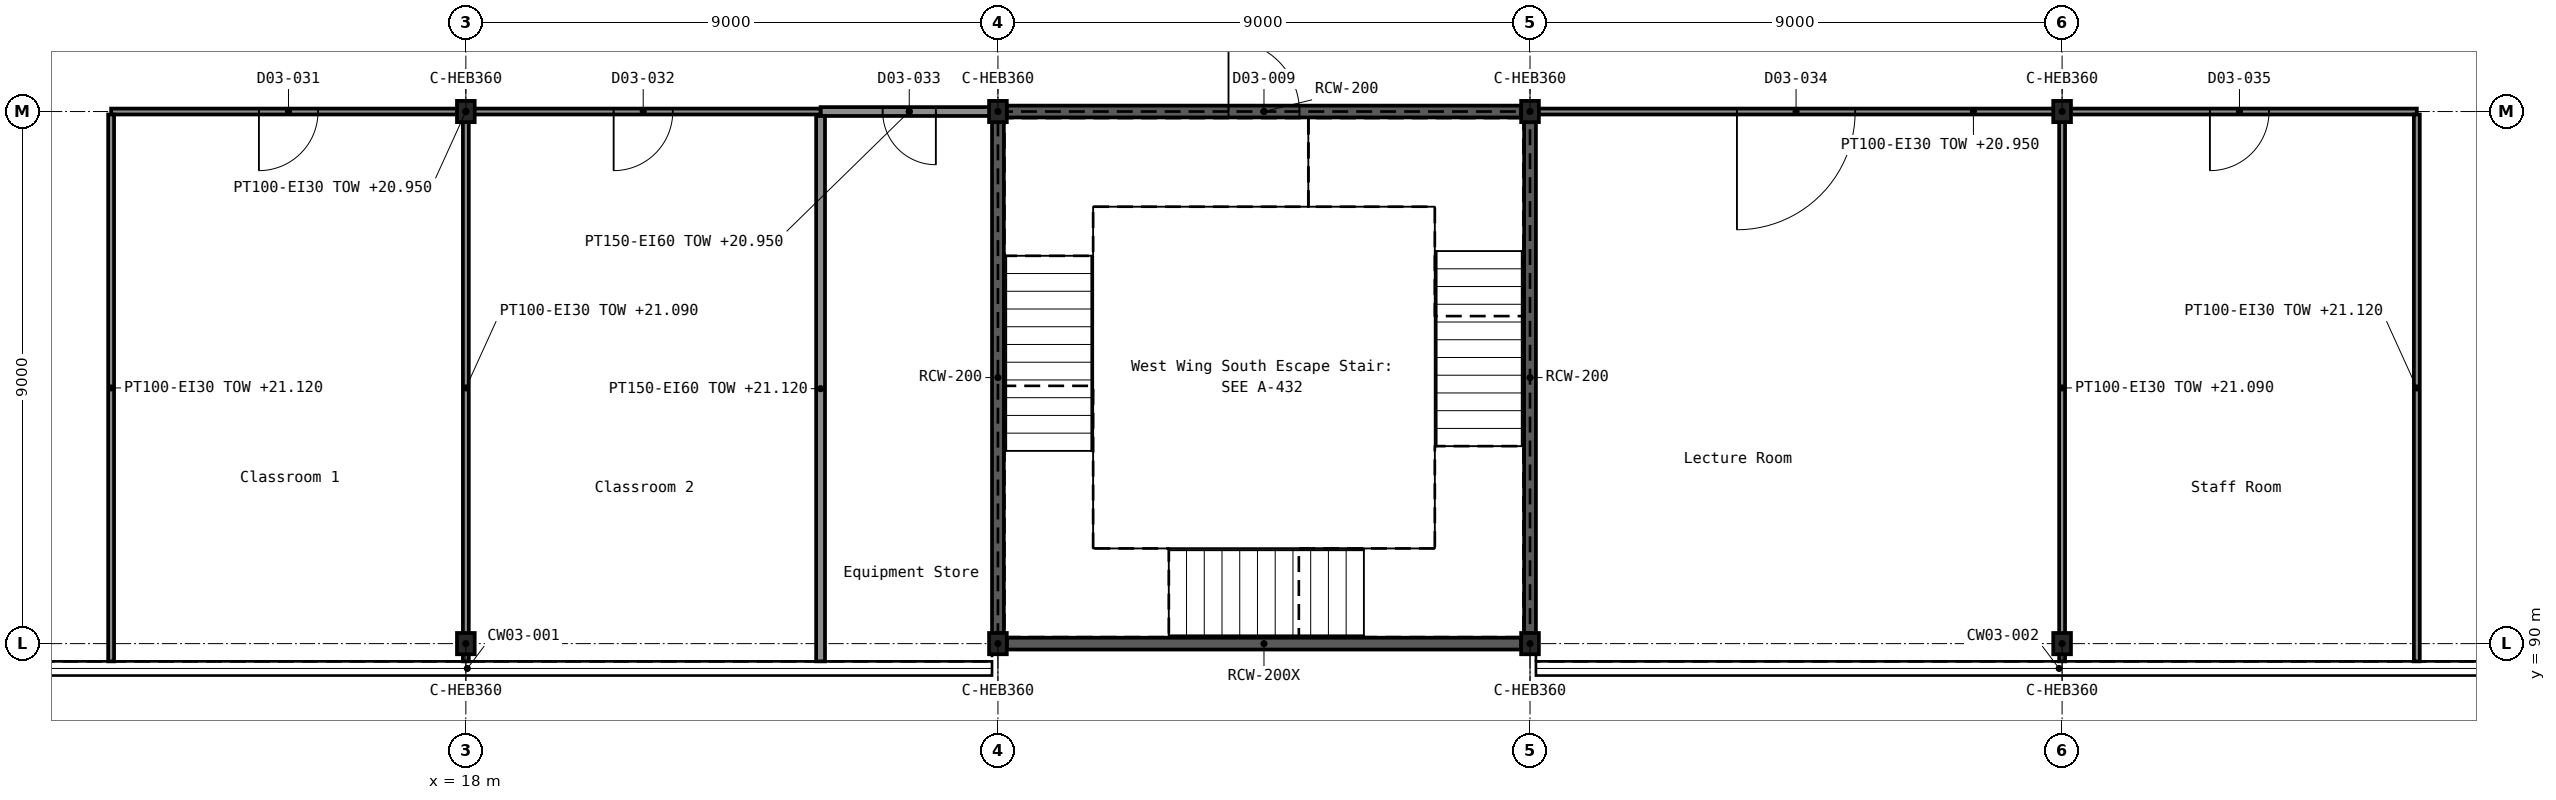
"""IFC4 building model, lengths in metres.
Left out: names, types, materials, properties, quantities, classifications, styles, units other than length and angle.
Written with IfcOpenShell. Run it as: python <this file> out.ifc"""

import sys

from ifc_helpers import new_model, si_unit, direction, frame, frame_2d, origin, origin_2d, place, context, subcontext, project, spatial, rectangle, i_section, extrude, element, fill, save


model = new_model("IFC4")
c1 = context("Model", 3, precision=1e-05, world=origin(), true_north=direction((0.0, 1.0)))
c2 = subcontext(c1, "Body", "Model", "MODEL_VIEW")
j1 = project(units=[si_unit("LENGTHUNIT", "METRE"), si_unit("PLANEANGLEUNIT", "RADIAN")], contexts=[c1])
p1 = place(None, origin())
s1 = spatial("IfcSite", under=j1, at=p1, CompositionType="ELEMENT")
p2 = place(p1, origin())
s2 = spatial("IfcBuilding", under=s1, at=p2, CompositionType="ELEMENT")
p3 = place(p2, frame((0.0, 0.0, 16.2)))
s3 = spatial("IfcBuildingStorey", under=s2, at=p3, CompositionType="ELEMENT", Elevation=16.2)
for number, where, z_axis, x_axis in (
    (1, (18.0, 90.0, 0.0), (0.0, 0.0, 1.0), (1.0, 0.0, 0.0)),
    (2, (27.0, 90.0, 0.0), (0.0, 0.0, 1.0), (1.0, 0.0, 0.0)),
    (3, (36.0, 90.0, 0.0), (0.0, 0.0, 1.0), (1.0, 0.0, 0.0)),
    (4, (45.0, 90.0, 0.0), (0.0, 0.0, 1.0), (1.0, 0.0, 0.0)),
    (5, (18.0, 99.0, 0.0), (0.0, 0.0, 1.0), (1.0, 0.0, 0.0)),
    (6, (27.0, 99.0, 0.0), (0.0, 0.0, 1.0), (1.0, 0.0, 0.0)),
    (7, (36.0, 99.0, 0.0), (0.0, 0.0, 1.0), (1.0, 0.0, 0.0)),
    (8, (45.0, 99.0, 0.0), (0.0, 0.0, 1.0), (1.0, 0.0, 0.0)),
):
    element("IfcColumn", number, at=place(p3, frame(where, z_axis=z_axis, x_axis=x_axis)), inside=s3, PredefinedType="COLUMN", context=c2, shape_type="SweptSolid", body=[
        extrude(i_section(OverallWidth=0.3, OverallDepth=0.36, WebThickness=0.012, FlangeThickness=0.022, FilletRadius=0.027, at=origin_2d()), origin(), (0.0, 0.0, 1.0), 5.4),
    ])
p4 = place(p3, frame((27.15, 90.0, 0.0), z_axis=(0.0, 0.0, 1.0), x_axis=(1.0, 0.0, 0.0)))
e9 = element("IfcWall", 9, at=p4, inside=s3, PredefinedType="SHEAR", context=c2, shape_type="SweptSolid", body=[
    extrude(rectangle(XDim=8.7, YDim=0.2, at=frame_2d((4.35, 0.0))), origin(), (0.0, 0.0, 1.0), 5.4),
])
p5 = place(p3, frame((27.15, 99.0, 0.0), z_axis=(0.0, 0.0, 1.0), x_axis=(1.0, 0.0, 0.0)))
e10 = element("IfcWall", 10, at=p5, inside=s3, PredefinedType="SHEAR", context=c2, shape_type="SweptSolid", body=[
    extrude(rectangle(XDim=8.7, YDim=0.2, at=frame_2d((4.35, 0.0))), origin(), (0.0, 0.0, 1.0), 5.4),
])
p6 = place(p5, frame((3.75, 0.0, 0.0)))
e11 = element("IfcOpeningElement", 11, at=p6, cuts=e10, PredefinedType="OPENING", context=c2, shape_type="SweptSolid", body=[
    extrude(rectangle(XDim=1.2, YDim=2.1, at=frame_2d((0.6, 1.05))), frame((0.0, 0.111, 0.0), z_axis=(0.0, -1.0, 0.0), x_axis=(1.0, 0.0, 0.0)), (0.0, 0.0, 1.0), 0.222),
])
for number, where, z_axis, x_axis in (
    (12, (27.0, 90.18, 0.0), (0.0, 0.0, 1.0), (0.0, 1.0, 0.0)),
    (13, (36.0, 90.18, 0.0), (0.0, 0.0, 1.0), (0.0, 1.0, 0.0)),
):
    element("IfcWall", number, at=place(p3, frame(where, z_axis=z_axis, x_axis=x_axis)), inside=s3, PredefinedType="SHEAR", context=c2, shape_type="SweptSolid", body=[
        extrude(rectangle(XDim=8.64, YDim=0.2, at=frame_2d((4.32, 0.0))), origin(), (0.0, 0.0, 1.0), 5.4),
    ])
p7 = place(p3, frame((24.0, 99.0, 0.0), z_axis=(0.0, 0.0, 1.0), x_axis=(1.0, 0.0, 0.0)))
e14 = element("IfcWall", 14, at=p7, inside=s3, PredefinedType="PARTITIONING", context=c2, shape_type="SweptSolid", body=[
    extrude(rectangle(XDim=3.0, YDim=0.15, at=frame_2d((1.5, 0.0))), origin(), (0.0, 0.0, 1.0), 4.75),
])
p8 = place(p7, frame((1.05, 0.0, 0.0)))
e15 = element("IfcOpeningElement", 15, at=p8, cuts=e14, PredefinedType="OPENING", context=c2, shape_type="SweptSolid", body=[
    extrude(rectangle(XDim=0.9, YDim=2.4, at=frame_2d((0.45, 1.2))), frame((0.0, 0.086, 0.0), z_axis=(0.0, -1.0, 0.0), x_axis=(1.0, 0.0, 0.0)), (0.0, 0.0, 1.0), 0.172),
])
p9 = place(p3, frame((24.0, 89.7, 0.0), z_axis=(0.0, 0.0, 1.0), x_axis=(0.0, 1.0, 0.0)))
e16 = element("IfcWall", 16, at=p9, inside=s3, PredefinedType="PARTITIONING", context=c2, shape_type="SweptSolid", body=[
    extrude(rectangle(XDim=9.225, YDim=0.15, at=frame_2d((4.613, 0.0))), origin(), (0.0, 0.0, 1.0), 4.92),
])
p10 = place(p3, frame((12.0, 99.0, 0.0), z_axis=(0.0, 0.0, 1.0), x_axis=(1.0, 0.0, 0.0)))
e17 = element("IfcWall", 17, at=p10, inside=s3, PredefinedType="PARTITIONING", context=c2, shape_type="SweptSolid", body=[
    extrude(rectangle(XDim=12.0, YDim=0.1, at=frame_2d((6.0, 0.0))), origin(), (0.0, 0.0, 1.0), 4.75),
])
p11 = place(p10, frame((2.5, 0.0, 0.0)))
e18 = element("IfcOpeningElement", 18, at=p11, cuts=e17, PredefinedType="OPENING", context=c2, shape_type="SweptSolid", body=[
    extrude(rectangle(XDim=1.0, YDim=2.1, at=frame_2d((0.5, 1.05))), frame((0.0, 0.061, 0.0), z_axis=(0.0, -1.0, 0.0), x_axis=(1.0, 0.0, 0.0)), (0.0, 0.0, 1.0), 0.122),
])
p12 = place(p10, frame((8.5, 0.0, 0.0)))
e19 = element("IfcOpeningElement", 19, at=p12, cuts=e17, PredefinedType="OPENING", context=c2, shape_type="SweptSolid", body=[
    extrude(rectangle(XDim=1.0, YDim=2.1, at=frame_2d((0.5, 1.05))), frame((0.0, 0.061, 0.0), z_axis=(0.0, -1.0, 0.0), x_axis=(1.0, 0.0, 0.0)), (0.0, 0.0, 1.0), 0.122),
])
p13 = place(p3, frame((36.0, 99.0, 0.0), z_axis=(0.0, 0.0, 1.0), x_axis=(1.0, 0.0, 0.0)))
e20 = element("IfcWall", 20, at=p13, inside=s3, PredefinedType="PARTITIONING", context=c2, shape_type="SweptSolid", body=[
    extrude(rectangle(XDim=15.0, YDim=0.1, at=frame_2d((7.5, 0.0))), origin(), (0.0, 0.0, 1.0), 4.75),
])
p14 = place(p13, frame((3.5, 0.0, 0.0)))
e21 = element("IfcOpeningElement", 21, at=p14, cuts=e20, PredefinedType="OPENING", context=c2, shape_type="SweptSolid", body=[
    extrude(rectangle(XDim=2.0, YDim=2.1, at=frame_2d((1.0, 1.05))), frame((0.0, 0.061, 0.0), z_axis=(0.0, -1.0, 0.0), x_axis=(1.0, 0.0, 0.0)), (0.0, 0.0, 1.0), 0.122),
])
p15 = place(p13, frame((11.5, 0.0, 0.0)))
e22 = element("IfcOpeningElement", 22, at=p15, cuts=e20, PredefinedType="OPENING", context=c2, shape_type="SweptSolid", body=[
    extrude(rectangle(XDim=1.0, YDim=2.1, at=frame_2d((0.5, 1.05))), frame((0.0, 0.061, 0.0), z_axis=(0.0, -1.0, 0.0), x_axis=(1.0, 0.0, 0.0)), (0.0, 0.0, 1.0), 0.122),
])
p16 = place(p3, frame((12.0, 89.7, 0.0), z_axis=(0.0, 0.0, 1.0), x_axis=(0.0, 1.0, 0.0)))
e23 = element("IfcWall", 23, at=p16, inside=s3, PredefinedType="PARTITIONING", context=c2, shape_type="SweptSolid", body=[
    extrude(rectangle(XDim=9.25, YDim=0.1, at=frame_2d((4.625, 0.0))), origin(), (0.0, 0.0, 1.0), 4.92),
])
for number, where, z_axis, x_axis in (
    (24, (18.0, 89.7, 0.0), (0.0, 0.0, 1.0), (0.0, 1.0, 0.0)),
    (25, (45.0, 89.7, 0.0), (0.0, 0.0, 1.0), (0.0, 1.0, 0.0)),
):
    element("IfcWall", number, at=place(p3, frame(where, z_axis=z_axis, x_axis=x_axis)), inside=s3, PredefinedType="PARTITIONING", context=c2, shape_type="SweptSolid", body=[
        extrude(rectangle(XDim=9.25, YDim=0.1, at=frame_2d((4.625, 0.0))), origin(), (0.0, 0.0, 1.0), 4.89),
    ])
p17 = place(p3, frame((51.0, 89.7, 0.0), z_axis=(0.0, 0.0, 1.0), x_axis=(0.0, 1.0, 0.0)))
e26 = element("IfcWall", 26, at=p17, inside=s3, PredefinedType="PARTITIONING", context=c2, shape_type="SweptSolid", body=[
    extrude(rectangle(XDim=9.25, YDim=0.1, at=frame_2d((4.625, 0.0))), origin(), (0.0, 0.0, 1.0), 4.92),
])
p18 = place(p6, origin())
e27 = element("IfcDoor", 27, at=p18, inside=s3, OperationType="SINGLE_SWING_LEFT", PredefinedType="DOOR", context=c2, shape_type="SweptSolid", body=[
    extrude(rectangle(XDim=1.2, YDim=2.1, at=frame_2d((0.6, 1.05))), frame((0.0, 0.025, 0.0), z_axis=(0.0, -1.0, 0.0), x_axis=(1.0, 0.0, 0.0)), (0.0, 0.0, 1.0), 0.05),
])
fill(e11, e27)
p19 = place(p11, frame((1.0, 0.0, 0.0), z_axis=(0.0, 0.0, 1.0), x_axis=(-1.0, 0.0, 0.0)))
e28 = element("IfcDoor", 28, at=p19, inside=s3, OperationType="SINGLE_SWING_RIGHT", PredefinedType="DOOR", context=c2, shape_type="SweptSolid", body=[
    extrude(rectangle(XDim=1.0, YDim=2.1, at=frame_2d((0.5, 1.05))), frame((0.0, 0.025, 0.0), z_axis=(0.0, -1.0, 0.0), x_axis=(1.0, 0.0, 0.0)), (0.0, 0.0, 1.0), 0.05),
])
fill(e18, e28)
p20 = place(p12, frame((1.0, 0.0, 0.0), z_axis=(0.0, 0.0, 1.0), x_axis=(-1.0, 0.0, 0.0)))
e29 = element("IfcDoor", 29, at=p20, inside=s3, OperationType="SINGLE_SWING_RIGHT", PredefinedType="DOOR", context=c2, shape_type="SweptSolid", body=[
    extrude(rectangle(XDim=1.0, YDim=2.1, at=frame_2d((0.5, 1.05))), frame((0.0, 0.025, 0.0), z_axis=(0.0, -1.0, 0.0), x_axis=(1.0, 0.0, 0.0)), (0.0, 0.0, 1.0), 0.05),
])
fill(e19, e29)
p21 = place(p8, frame((0.9, 0.0, 0.0), z_axis=(0.0, 0.0, 1.0), x_axis=(-1.0, 0.0, 0.0)))
e30 = element("IfcDoor", 30, at=p21, inside=s3, OperationType="SINGLE_SWING_LEFT", PredefinedType="DOOR", context=c2, shape_type="SweptSolid", body=[
    extrude(rectangle(XDim=0.9, YDim=2.4, at=frame_2d((0.45, 1.2))), frame((0.0, 0.025, 0.0), z_axis=(0.0, -1.0, 0.0), x_axis=(1.0, 0.0, 0.0)), (0.0, 0.0, 1.0), 0.05),
])
fill(e15, e30)
p22 = place(p14, frame((2.0, 0.0, 0.0), z_axis=(0.0, 0.0, 1.0), x_axis=(-1.0, 0.0, 0.0)))
e31 = element("IfcDoor", 31, at=p22, inside=s3, OperationType="DOUBLE_DOOR_SINGLE_SWING", PredefinedType="DOOR", context=c2, shape_type="SweptSolid", body=[
    extrude(rectangle(XDim=2.0, YDim=2.1, at=frame_2d((1.0, 1.05))), frame((0.0, 0.025, 0.0), z_axis=(0.0, -1.0, 0.0), x_axis=(1.0, 0.0, 0.0)), (0.0, 0.0, 1.0), 0.05),
])
fill(e21, e31)
p23 = place(p15, frame((1.0, 0.0, 0.0), z_axis=(0.0, 0.0, 1.0), x_axis=(-1.0, 0.0, 0.0)))
e32 = element("IfcDoor", 32, at=p23, inside=s3, OperationType="SINGLE_SWING_RIGHT", PredefinedType="DOOR", context=c2, shape_type="SweptSolid", body=[
    extrude(rectangle(XDim=1.0, YDim=2.1, at=frame_2d((0.5, 1.05))), frame((0.0, 0.025, 0.0), z_axis=(0.0, -1.0, 0.0), x_axis=(1.0, 0.0, 0.0)), (0.0, 0.0, 1.0), 0.05),
])
fill(e22, e32)
save(model, sys.argv[1])
